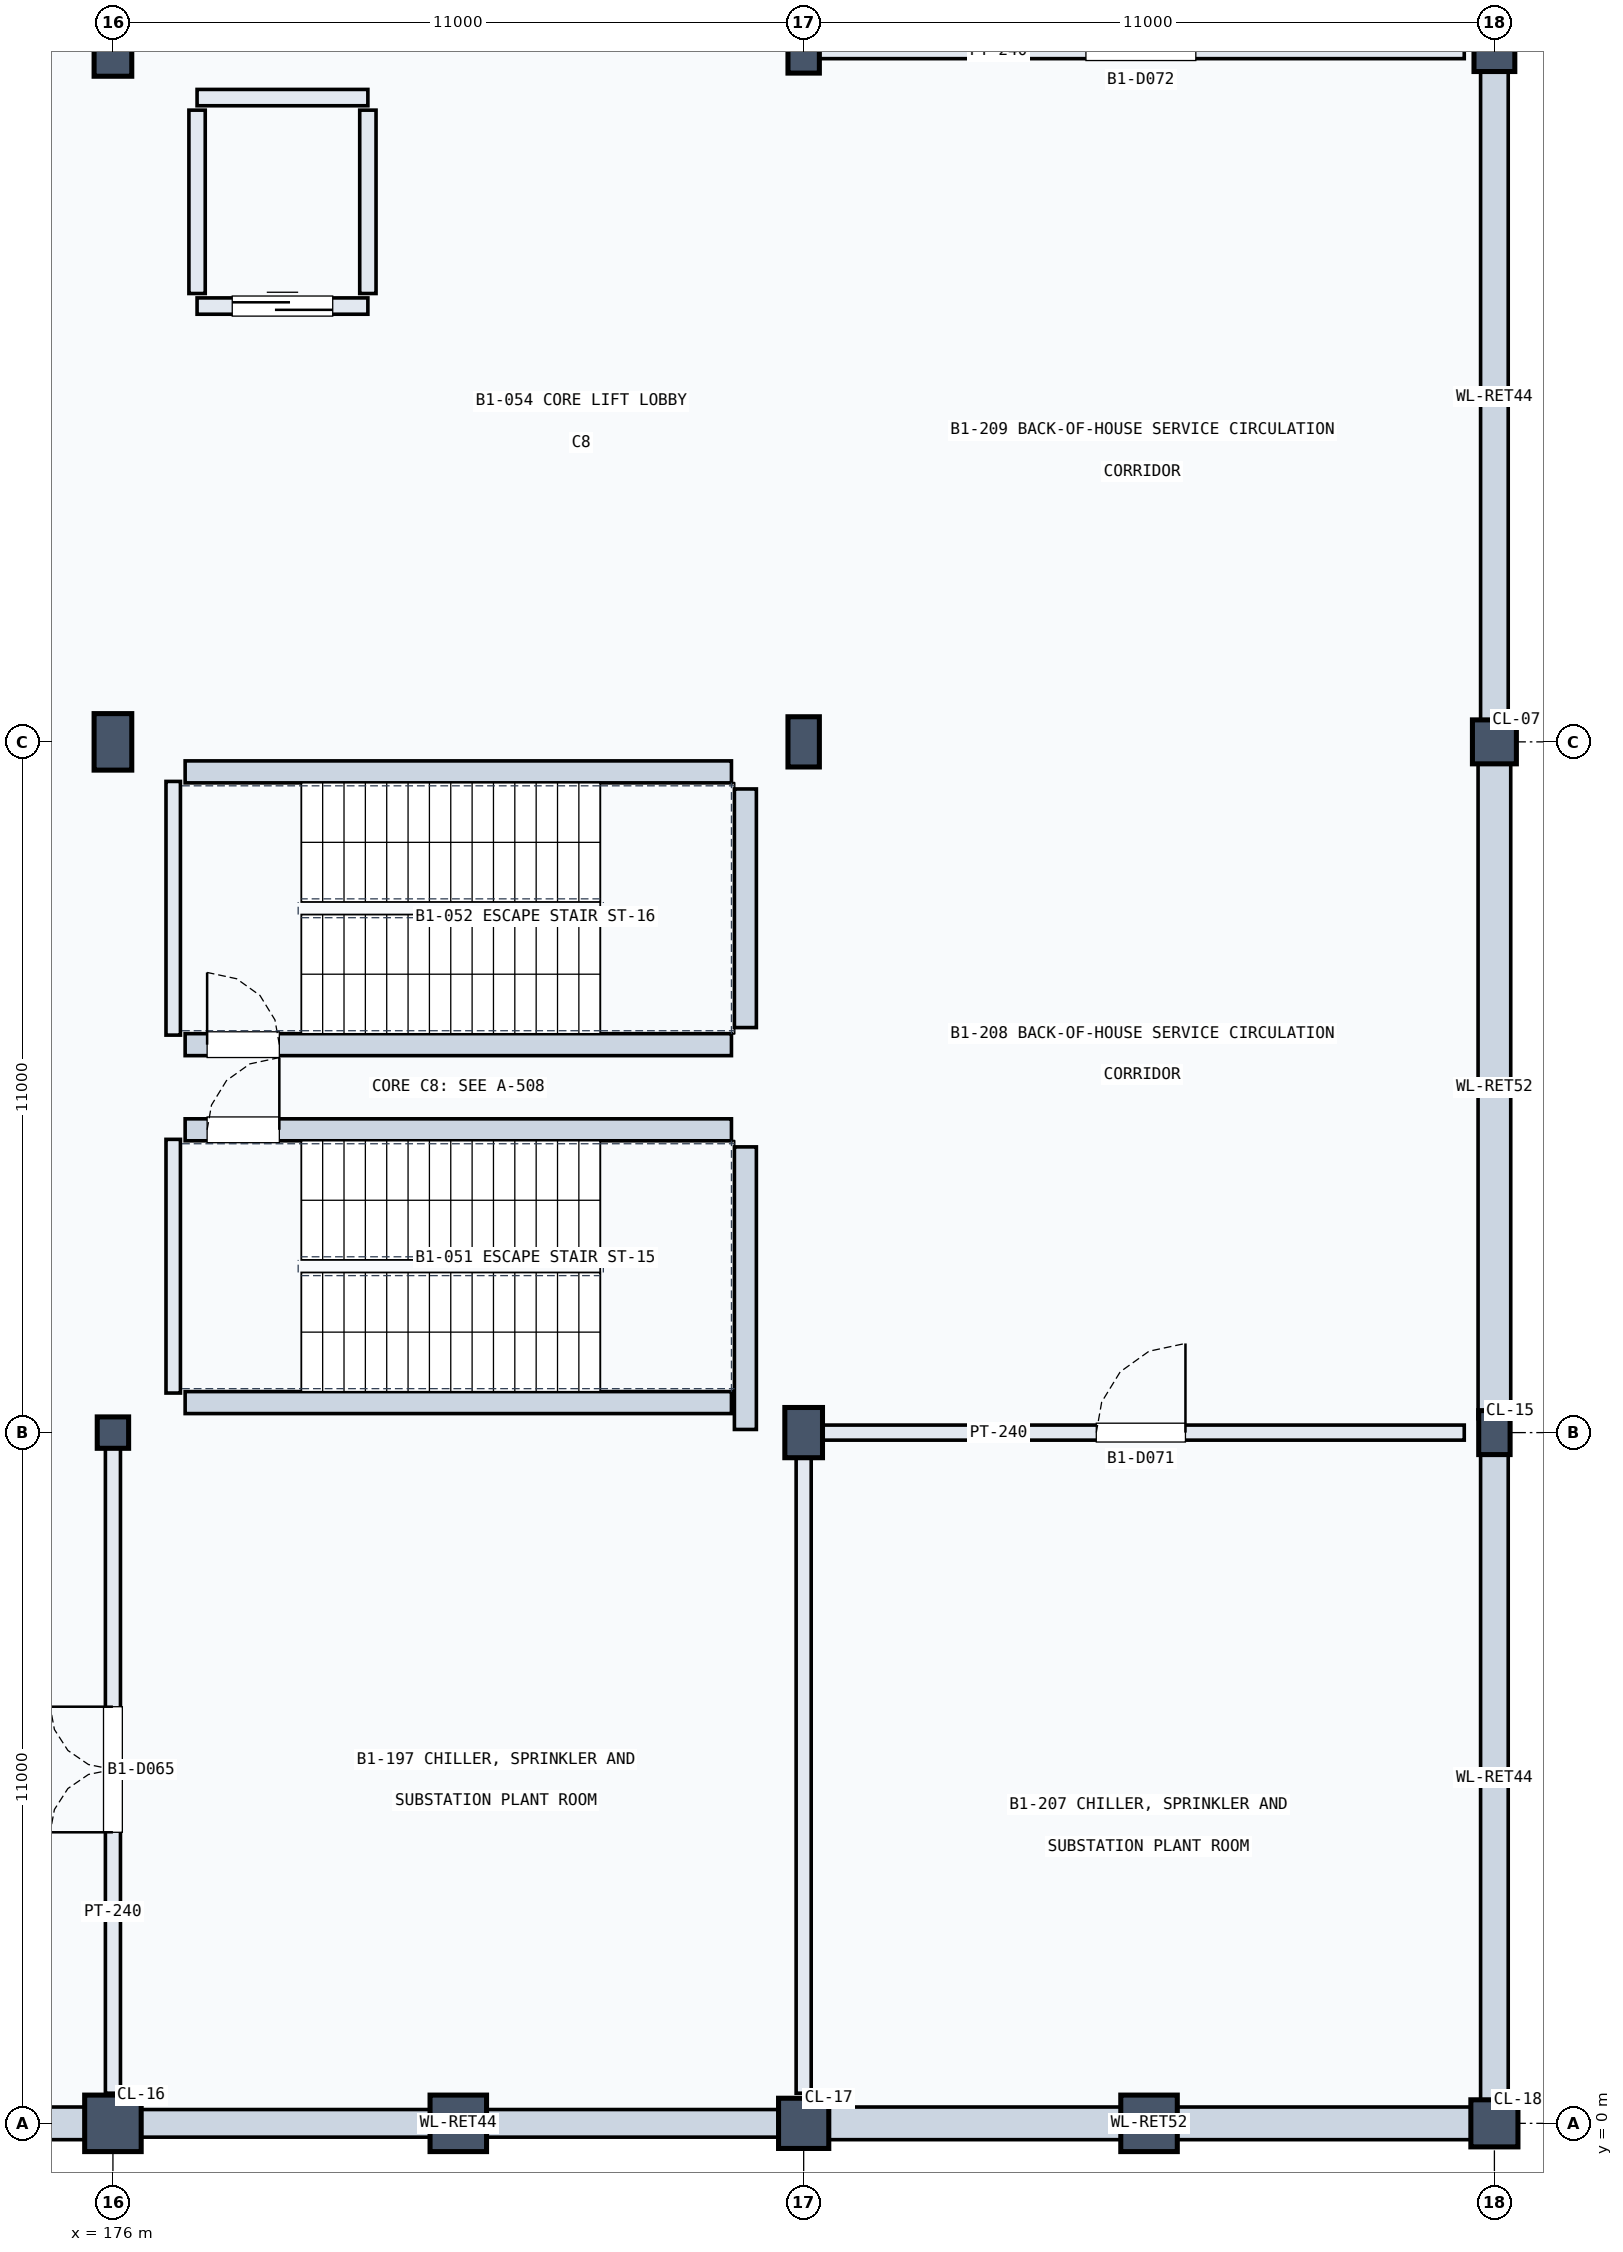
"""IFC4 building model, lengths in metres.
Left out: names, types, materials, properties, quantities, classifications, styles, units other than length and angle.
Written with IfcOpenShell. Run it as: python <this file> out.ifc"""

import sys

from ifc_helpers import new_model, si_unit, direction, frame, frame_2d, origin, origin_2d, place, context, subcontext, project, spatial, rectangle, circle, extrude, element, fill, save


model = new_model("IFC4")
c1 = context("Model", 3, precision=1e-05, world=origin(), true_north=direction((0.0, 1.0)))
c2 = subcontext(c1, "Body", "Model", "MODEL_VIEW")
j1 = project(units=[si_unit("LENGTHUNIT", "METRE"), si_unit("PLANEANGLEUNIT", "RADIAN")], contexts=[c1])
p1 = place(None, origin())
s1 = spatial("IfcSite", under=j1, at=p1, CompositionType="ELEMENT")
p2 = place(p1, origin())
s2 = spatial("IfcBuilding", under=s1, at=p2, CompositionType="ELEMENT")
p3 = place(p2, frame((0.0, 0.0, -5.4)))
s3 = spatial("IfcBuildingStorey", under=s2, at=p3, CompositionType="ELEMENT", Elevation=-5.4)
p4 = place(p3, frame((176.0, 0.0, 0.0), z_axis=(0.0, 0.0, 1.0), x_axis=(1.0, 0.0, 0.0)))
e1 = element("IfcColumn", 1, at=p4, inside=s3, PredefinedType="COLUMN", context=c2, shape_type="SweptSolid", body=[
    extrude(circle(Radius=0.45, at=origin_2d()), origin(), (0.0, 0.0, 1.0), 5.4),
])
p5 = place(p3, frame((176.0, 11.0, 0.0), z_axis=(0.0, 0.0, 1.0), x_axis=(1.0, 0.0, 0.0)))
e2 = element("IfcColumn", 2, at=p5, inside=s3, PredefinedType="COLUMN", context=c2, shape_type="SweptSolid", body=[
    extrude(rectangle(XDim=0.5, YDim=0.5, at=origin_2d()), origin(), (0.0, 0.0, 1.0), 5.4),
])
p6 = place(p3, frame((176.0, 22.0, 0.0), z_axis=(0.0, 0.0, 1.0), x_axis=(1.0, 0.0, 0.0)))
e3 = element("IfcColumn", 3, at=p6, inside=s3, PredefinedType="COLUMN", context=c2, shape_type="SweptSolid", body=[
    extrude(rectangle(XDim=0.6, YDim=0.9, at=origin_2d()), origin(), (0.0, 0.0, 1.0), 5.4),
])
p7 = place(p3, frame((176.0, 33.0, 0.0), z_axis=(0.0, 0.0, 1.0), x_axis=(1.0, 0.0, 0.0)))
e4 = element("IfcColumn", 4, at=p7, inside=s3, PredefinedType="COLUMN", context=c2, shape_type="SweptSolid", body=[
    extrude(rectangle(XDim=0.6, YDim=0.8, at=origin_2d()), origin(), (0.0, 0.0, 1.0), 5.4),
])
p8 = place(p3, frame((187.0, 0.0, 0.0), z_axis=(0.0, 0.0, 1.0), x_axis=(1.0, 0.0, 0.0)))
e5 = element("IfcColumn", 5, at=p8, inside=s3, PredefinedType="COLUMN", context=c2, shape_type="SweptSolid", body=[
    extrude(circle(Radius=0.4, at=origin_2d()), origin(), (0.0, 0.0, 1.0), 5.4),
])
p9 = place(p3, frame((187.0, 11.0, 0.0), z_axis=(0.0, 0.0, 1.0), x_axis=(1.0, 0.0, 0.0)))
e6 = element("IfcColumn", 6, at=p9, inside=s3, PredefinedType="COLUMN", context=c2, shape_type="SweptSolid", body=[
    extrude(rectangle(XDim=0.6, YDim=0.8, at=origin_2d()), origin(), (0.0, 0.0, 1.0), 5.4),
])
p10 = place(p3, frame((187.0, 22.0, 0.0), z_axis=(0.0, 0.0, 1.0), x_axis=(1.0, 0.0, 0.0)))
e7 = element("IfcColumn", 7, at=p10, inside=s3, PredefinedType="COLUMN", context=c2, shape_type="SweptSolid", body=[
    extrude(rectangle(XDim=0.5, YDim=0.8, at=origin_2d()), origin(), (0.0, 0.0, 1.0), 5.4),
])
p11 = place(p3, frame((187.0, 33.0, 0.0), z_axis=(0.0, 0.0, 1.0), x_axis=(1.0, 0.0, 0.0)))
e8 = element("IfcColumn", 8, at=p11, inside=s3, PredefinedType="COLUMN", context=c2, shape_type="SweptSolid", body=[
    extrude(rectangle(XDim=0.5, YDim=0.7, at=origin_2d()), origin(), (0.0, 0.0, 1.0), 5.4),
])
p12 = place(p3, frame((198.0, 0.0, 0.0), z_axis=(0.0, 0.0, 1.0), x_axis=(1.0, 0.0, 0.0)))
e9 = element("IfcColumn", 9, at=p12, inside=s3, PredefinedType="COLUMN", context=c2, shape_type="SweptSolid", body=[
    extrude(circle(Radius=0.375, at=origin_2d()), origin(), (0.0, 0.0, 1.0), 5.4),
])
p13 = place(p3, frame((198.0, 11.0, 0.0), z_axis=(0.0, 0.0, 1.0), x_axis=(1.0, 0.0, 0.0)))
e10 = element("IfcColumn", 10, at=p13, inside=s3, PredefinedType="COLUMN", context=c2, shape_type="SweptSolid", body=[
    extrude(rectangle(XDim=0.5, YDim=0.7, at=origin_2d()), origin(), (0.0, 0.0, 1.0), 5.4),
])
p14 = place(p3, frame((198.0, 22.0, 0.0), z_axis=(0.0, 0.0, 1.0), x_axis=(1.0, 0.0, 0.0)))
e11 = element("IfcColumn", 11, at=p14, inside=s3, PredefinedType="COLUMN", context=c2, shape_type="SweptSolid", body=[
    extrude(rectangle(XDim=0.7, YDim=0.7, at=origin_2d()), origin(), (0.0, 0.0, 1.0), 5.4),
])
p15 = place(p3, frame((198.0, 33.0, 0.0), z_axis=(0.0, 0.0, 1.0), x_axis=(1.0, 0.0, 0.0)))
e12 = element("IfcColumn", 12, at=p15, inside=s3, PredefinedType="COLUMN", context=c2, shape_type="SweptSolid", body=[
    extrude(rectangle(XDim=0.65, YDim=0.65, at=origin_2d()), origin(), (0.0, 0.0, 1.0), 5.4),
])
for number, where, z_axis, x_axis in (
    (13, (181.5, 0.0, 0.0), (0.0, 0.0, 1.0), (1.0, 0.0, 0.0)),
    (14, (192.5, 0.0, 0.0), (0.0, 0.0, 1.0), (1.0, 0.0, 0.0)),
):
    element("IfcColumn", number, at=place(p3, frame(where, z_axis=z_axis, x_axis=x_axis)), inside=s3, PredefinedType="COLUMN", context=c2, shape_type="SweptSolid", body=[
        extrude(circle(Radius=0.45, at=origin_2d()), origin(), (0.0, 0.0, 1.0), 5.4),
    ])
p16 = place(p3, frame((164.22, 0.0, 0.0), z_axis=(0.0, 0.0, 1.0), x_axis=(1.0, 0.0, 0.0)))
e15 = element("IfcWall", 15, at=p16, inside=s3, PredefinedType="SOLIDWALL", context=c2, shape_type="SweptSolid", body=[
    extrude(rectangle(XDim=11.56, YDim=0.52, at=frame_2d((5.78, 0.0))), origin(), (0.0, 0.0, 1.0), 4.346),
])
p17 = place(p3, frame((176.22, 0.0, 0.0), z_axis=(0.0, 0.0, 1.0), x_axis=(1.0, 0.0, 0.0)))
e16 = element("IfcWall", 16, at=p17, inside=s3, PredefinedType="SOLIDWALL", context=c2, shape_type="SweptSolid", body=[
    extrude(rectangle(XDim=10.56, YDim=0.44, at=frame_2d((5.28, 0.0))), origin(), (0.0, 0.0, 1.0), 4.13),
])
p18 = place(p3, frame((187.22, 0.0, 0.0), z_axis=(0.0, 0.0, 1.0), x_axis=(1.0, 0.0, 0.0)))
e17 = element("IfcWall", 17, at=p18, inside=s3, PredefinedType="SOLIDWALL", context=c2, shape_type="SweptSolid", body=[
    extrude(rectangle(XDim=10.56, YDim=0.52, at=frame_2d((5.28, 0.0))), origin(), (0.0, 0.0, 1.0), 4.13),
])
p19 = place(p3, frame((198.0, 0.22, 0.0), z_axis=(0.0, 0.0, 1.0), x_axis=(0.0, 1.0, 0.0)))
e18 = element("IfcWall", 18, at=p19, inside=s3, PredefinedType="SOLIDWALL", context=c2, shape_type="SweptSolid", body=[
    extrude(rectangle(XDim=10.56, YDim=0.44, at=frame_2d((5.28, 0.0))), origin(), (0.0, 0.0, 1.0), 4.346),
])
p20 = place(p3, frame((198.0, 11.22, 0.0), z_axis=(0.0, 0.0, 1.0), x_axis=(0.0, 1.0, 0.0)))
e19 = element("IfcWall", 19, at=p20, inside=s3, PredefinedType="SOLIDWALL", context=c2, shape_type="SweptSolid", body=[
    extrude(rectangle(XDim=10.56, YDim=0.52, at=frame_2d((5.28, 0.0))), origin(), (0.0, 0.0, 1.0), 4.346),
])
p21 = place(p3, frame((198.0, 22.22, 0.0), z_axis=(0.0, 0.0, 1.0), x_axis=(0.0, 1.0, 0.0)))
e20 = element("IfcWall", 20, at=p21, inside=s3, PredefinedType="SOLIDWALL", context=c2, shape_type="SweptSolid", body=[
    extrude(rectangle(XDim=10.56, YDim=0.44, at=frame_2d((5.28, 0.0))), origin(), (0.0, 0.0, 1.0), 4.418),
])
p22 = place(p3, frame((176.96, 11.63, 0.0), z_axis=(0.0, 0.0, 1.0), x_axis=(0.0, 1.0, 0.0)))
e21 = element("IfcWall", 21, at=p22, inside=s3, PredefinedType="SOLIDWALL", context=c2, shape_type="SweptSolid", body=[
    extrude(rectangle(XDim=4.04, YDim=0.23, at=frame_2d((2.02, 0.0))), origin(), (0.0, 0.0, 1.0), 5.04),
])
p23 = place(p3, frame((186.072, 11.05, 0.0), z_axis=(0.0, 0.0, 1.0), x_axis=(0.0, 1.0, 0.0)))
e22 = element("IfcWall", 22, at=p23, inside=s3, PredefinedType="SOLIDWALL", context=c2, shape_type="SweptSolid", body=[
    extrude(rectangle(XDim=4.5, YDim=0.35, at=frame_2d((2.25, 0.0))), origin(), (0.0, 0.0, 1.0), 5.04),
])
p24 = place(p3, frame((177.15, 11.478, 0.0), z_axis=(0.0, 0.0, 1.0), x_axis=(1.0, 0.0, 0.0)))
e23 = element("IfcWall", 23, at=p24, inside=s3, PredefinedType="SOLIDWALL", context=c2, shape_type="SweptSolid", body=[
    extrude(rectangle(XDim=8.7, YDim=0.35, at=frame_2d((4.35, 0.0))), origin(), (0.0, 0.0, 1.0), 5.04),
])
p25 = place(p3, frame((177.15, 15.822, 0.0), z_axis=(0.0, 0.0, 1.0), x_axis=(1.0, 0.0, 0.0)))
e24 = element("IfcWall", 24, at=p25, inside=s3, PredefinedType="SOLIDWALL", context=c2, shape_type="SweptSolid", body=[
    extrude(rectangle(XDim=8.7, YDim=0.35, at=frame_2d((4.35, 0.0))), origin(), (0.0, 0.0, 1.0), 5.04),
])
p26 = place(p25, frame((0.35, 0.0, 0.0)))
e25 = element("IfcOpeningElement", 25, at=p26, cuts=e24, PredefinedType="OPENING", context=c2, shape_type="SweptSolid", body=[
    extrude(rectangle(XDim=1.15, YDim=2.2, at=frame_2d((0.575, 1.1))), frame((0.0, 0.185, 0.0), z_axis=(0.0, -1.0, 0.0), x_axis=(1.0, 0.0, 0.0)), (0.0, 0.0, 1.0), 0.37),
])
p27 = place(p3, frame((176.96, 17.33, 0.0), z_axis=(0.0, 0.0, 1.0), x_axis=(0.0, 1.0, 0.0)))
e26 = element("IfcWall", 26, at=p27, inside=s3, PredefinedType="SOLIDWALL", context=c2, shape_type="SweptSolid", body=[
    extrude(rectangle(XDim=4.04, YDim=0.23, at=frame_2d((2.02, 0.0))), origin(), (0.0, 0.0, 1.0), 5.04),
])
p28 = place(p3, frame((186.072, 17.45, 0.0), z_axis=(0.0, 0.0, 1.0), x_axis=(0.0, 1.0, 0.0)))
e27 = element("IfcWall", 27, at=p28, inside=s3, PredefinedType="SOLIDWALL", context=c2, shape_type="SweptSolid", body=[
    extrude(rectangle(XDim=3.8, YDim=0.35, at=frame_2d((1.9, 0.0))), origin(), (0.0, 0.0, 1.0), 5.04),
])
p29 = place(p3, frame((177.15, 17.178, 0.0), z_axis=(0.0, 0.0, 1.0), x_axis=(1.0, 0.0, 0.0)))
e28 = element("IfcWall", 28, at=p29, inside=s3, PredefinedType="SOLIDWALL", context=c2, shape_type="SweptSolid", body=[
    extrude(rectangle(XDim=8.7, YDim=0.35, at=frame_2d((4.35, 0.0))), origin(), (0.0, 0.0, 1.0), 5.04),
])
p30 = place(p29, frame((0.35, 0.0, 0.0)))
e29 = element("IfcOpeningElement", 29, at=p30, cuts=e28, PredefinedType="OPENING", context=c2, shape_type="SweptSolid", body=[
    extrude(rectangle(XDim=1.15, YDim=2.2, at=frame_2d((0.575, 1.1))), frame((0.0, 0.185, 0.0), z_axis=(0.0, -1.0, 0.0), x_axis=(1.0, 0.0, 0.0)), (0.0, 0.0, 1.0), 0.37),
])
p31 = place(p3, frame((177.15, 21.522, 0.0), z_axis=(0.0, 0.0, 1.0), x_axis=(1.0, 0.0, 0.0)))
e30 = element("IfcWall", 30, at=p31, inside=s3, PredefinedType="SOLIDWALL", context=c2, shape_type="SweptSolid", body=[
    extrude(rectangle(XDim=8.7, YDim=0.35, at=frame_2d((4.35, 0.0))), origin(), (0.0, 0.0, 1.0), 5.04),
])
p32 = place(p3, frame((177.34, 28.94, 0.0), z_axis=(0.0, 0.0, 1.0), x_axis=(1.0, 0.0, 0.0)))
e31 = element("IfcWall", 31, at=p32, inside=s3, PredefinedType="SOLIDWALL", context=c2, shape_type="SweptSolid", body=[
    extrude(rectangle(XDim=2.72, YDim=0.26, at=frame_2d((1.36, 0.0))), origin(), (0.0, 0.0, 1.0), 5.04),
])
p33 = place(p32, frame((0.56, 0.0, 0.0)))
e32 = element("IfcOpeningElement", 32, at=p33, cuts=e31, PredefinedType="OPENING", context=c2, shape_type="SweptSolid", body=[
    extrude(rectangle(XDim=1.6, YDim=2.35, at=frame_2d((0.8, 1.175))), frame((0.0, 0.14, 0.0), z_axis=(0.0, -1.0, 0.0), x_axis=(1.0, 0.0, 0.0)), (0.0, 0.0, 1.0), 0.28),
])
p34 = place(p3, frame((177.34, 32.26, 0.0), z_axis=(0.0, 0.0, 1.0), x_axis=(1.0, 0.0, 0.0)))
e33 = element("IfcWall", 33, at=p34, inside=s3, PredefinedType="SOLIDWALL", context=c2, shape_type="SweptSolid", body=[
    extrude(rectangle(XDim=2.72, YDim=0.26, at=frame_2d((1.36, 0.0))), origin(), (0.0, 0.0, 1.0), 5.04),
])
for number, where, z_axis, x_axis in (
    (34, (177.34, 29.14, 0.0), (0.0, 0.0, 1.0), (0.0, 1.0, 0.0)),
    (35, (180.06, 29.14, 0.0), (0.0, 0.0, 1.0), (0.0, 1.0, 0.0)),
):
    element("IfcWall", number, at=place(p3, frame(where, z_axis=z_axis, x_axis=x_axis)), inside=s3, PredefinedType="SOLIDWALL", context=c2, shape_type="SweptSolid", body=[
        extrude(rectangle(XDim=2.92, YDim=0.26, at=frame_2d((1.46, 0.0))), origin(), (0.0, 0.0, 1.0), 5.04),
    ])
p35 = place(p3, frame((176.0, 0.48, 0.0), z_axis=(0.0, 0.0, 1.0), x_axis=(0.0, 1.0, 0.0)))
e36 = element("IfcWall", 36, at=p35, inside=s3, PredefinedType="PARTITIONING", context=c2, shape_type="SweptSolid", body=[
    extrude(rectangle(XDim=10.31, YDim=0.24, at=frame_2d((5.155, 0.0))), origin(), (0.0, 0.0, 1.0), 4.33),
])
p36 = place(p35, frame((4.155, 0.0, 0.0)))
e37 = element("IfcOpeningElement", 37, at=p36, cuts=e36, PredefinedType="OPENING", context=c2, shape_type="SweptSolid", body=[
    extrude(rectangle(XDim=2.0, YDim=2.25, at=frame_2d((1.0, 1.125))), frame((0.0, 0.13, 0.0), z_axis=(0.0, -1.0, 0.0), x_axis=(1.0, 0.0, 0.0)), (0.0, 0.0, 1.0), 0.26),
])
p37 = place(p3, frame((187.22, 11.0, 0.0), z_axis=(0.0, 0.0, 1.0), x_axis=(1.0, 0.0, 0.0)))
e38 = element("IfcWall", 38, at=p37, inside=s3, PredefinedType="PARTITIONING", context=c2, shape_type="SweptSolid", body=[
    extrude(rectangle(XDim=10.3, YDim=0.24, at=frame_2d((5.15, 0.0))), origin(), (0.0, 0.0, 1.0), 4.08),
])
p38 = place(p37, frame((4.44, 0.0, 0.0)))
e39 = element("IfcOpeningElement", 39, at=p38, cuts=e38, PredefinedType="OPENING", context=c2, shape_type="SweptSolid", body=[
    extrude(rectangle(XDim=1.42, YDim=2.25, at=frame_2d((0.71, 1.125))), frame((0.0, 0.13, 0.0), z_axis=(0.0, -1.0, 0.0), x_axis=(1.0, 0.0, 0.0)), (0.0, 0.0, 1.0), 0.26),
])
p39 = place(p3, frame((187.22, 33.0, 0.0), z_axis=(0.0, 0.0, 1.0), x_axis=(1.0, 0.0, 0.0)))
e40 = element("IfcWall", 40, at=p39, inside=s3, PredefinedType="PARTITIONING", context=c2, shape_type="SweptSolid", body=[
    extrude(rectangle(XDim=10.3, YDim=0.24, at=frame_2d((5.15, 0.0))), origin(), (0.0, 0.0, 1.0), 4.23),
])
p40 = place(p39, frame((4.275, 0.0, 0.0)))
e41 = element("IfcOpeningElement", 41, at=p40, cuts=e40, PredefinedType="OPENING", context=c2, shape_type="SweptSolid", body=[
    extrude(rectangle(XDim=1.75, YDim=2.25, at=frame_2d((0.875, 1.125))), frame((0.0, 0.13, 0.0), z_axis=(0.0, -1.0, 0.0), x_axis=(1.0, 0.0, 0.0)), (0.0, 0.0, 1.0), 0.26),
])
p41 = place(p3, frame((187.0, 0.48, 0.0), z_axis=(0.0, 0.0, 1.0), x_axis=(0.0, 1.0, 0.0)))
e42 = element("IfcWall", 42, at=p41, inside=s3, PredefinedType="PARTITIONING", context=c2, shape_type="SweptSolid", body=[
    extrude(rectangle(XDim=10.3, YDim=0.24, at=frame_2d((5.15, 0.0))), origin(), (0.0, 0.0, 1.0), 4.08),
])
p42 = place(p26, origin())
e43 = element("IfcDoor", 43, at=p42, inside=s3, OperationType="SINGLE_SWING_RIGHT", PredefinedType="DOOR", context=c2, shape_type="SweptSolid", body=[
    extrude(rectangle(XDim=1.15, YDim=2.2, at=frame_2d((0.575, 1.1))), frame((0.0, 0.025, 0.0), z_axis=(0.0, -1.0, 0.0), x_axis=(1.0, 0.0, 0.0)), (0.0, 0.0, 1.0), 0.05),
])
fill(e25, e43)
p43 = place(p30, origin())
e44 = element("IfcDoor", 44, at=p43, inside=s3, OperationType="SINGLE_SWING_LEFT", PredefinedType="DOOR", context=c2, shape_type="SweptSolid", body=[
    extrude(rectangle(XDim=1.15, YDim=2.2, at=frame_2d((0.575, 1.1))), frame((0.0, 0.025, 0.0), z_axis=(0.0, -1.0, 0.0), x_axis=(1.0, 0.0, 0.0)), (0.0, 0.0, 1.0), 0.05),
])
fill(e29, e44)
p44 = place(p33, origin())
e45 = element("IfcDoor", 45, at=p44, inside=s3, OperationType="DOUBLE_DOOR_SLIDING", PredefinedType="DOOR", context=c2, shape_type="SweptSolid", body=[
    extrude(rectangle(XDim=1.6, YDim=2.35, at=frame_2d((0.8, 1.175))), frame((0.0, 0.025, 0.0), z_axis=(0.0, -1.0, 0.0), x_axis=(1.0, 0.0, 0.0)), (0.0, 0.0, 1.0), 0.05),
])
fill(e32, e45)
p45 = place(p36, origin())
e46 = element("IfcDoor", 46, at=p45, inside=s3, OperationType="DOUBLE_DOOR_SINGLE_SWING", PredefinedType="DOOR", context=c2, shape_type="SweptSolid", body=[
    extrude(rectangle(XDim=2.0, YDim=2.25, at=frame_2d((1.0, 1.125))), frame((0.0, 0.025, 0.0), z_axis=(0.0, -1.0, 0.0), x_axis=(1.0, 0.0, 0.0)), (0.0, 0.0, 1.0), 0.05),
])
fill(e37, e46)
p46 = place(p38, origin())
e47 = element("IfcDoor", 47, at=p46, inside=s3, OperationType="SINGLE_SWING_RIGHT", PredefinedType="DOOR", context=c2, shape_type="SweptSolid", body=[
    extrude(rectangle(XDim=1.42, YDim=2.25, at=frame_2d((0.71, 1.125))), frame((0.0, 0.025, 0.0), z_axis=(0.0, -1.0, 0.0), x_axis=(1.0, 0.0, 0.0)), (0.0, 0.0, 1.0), 0.05),
])
fill(e39, e47)
p47 = place(p40, origin())
e48 = element("IfcDoor", 48, at=p47, inside=s3, OperationType="DOUBLE_DOOR_SINGLE_SWING", PredefinedType="DOOR", context=c2, shape_type="SweptSolid", body=[
    extrude(rectangle(XDim=1.75, YDim=2.25, at=frame_2d((0.875, 1.125))), frame((0.0, 0.025, 0.0), z_axis=(0.0, -1.0, 0.0), x_axis=(1.0, 0.0, 0.0)), (0.0, 0.0, 1.0), 0.05),
])
fill(e41, e48)
save(model, sys.argv[1])
